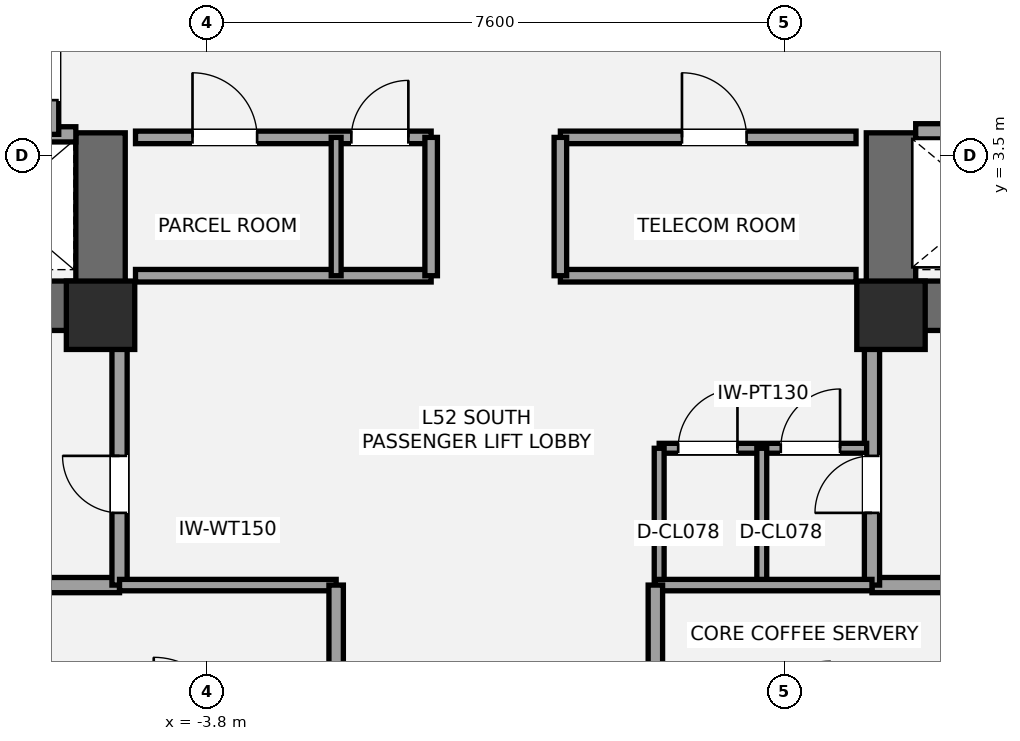
"""IFC4 building model, lengths in metres.
Left out: names, types, materials, properties, quantities, classifications, styles, units other than length and angle.
Written with IfcOpenShell. Run it as: python <this file> out.ifc"""

import sys

from ifc_helpers import new_model, si_unit, direction, frame, frame_2d, origin, origin_2d, place, context, subcontext, project, spatial, rectangle, extrude, element, fill, save


model = new_model("IFC4")
c1 = context("Model", 3, precision=1e-05, world=origin(), true_north=direction((0.0, 1.0)))
c2 = subcontext(c1, "Body", "Model", "MODEL_VIEW")
j1 = project(units=[si_unit("LENGTHUNIT", "METRE"), si_unit("PLANEANGLEUNIT", "RADIAN")], contexts=[c1])
p1 = place(None, origin())
s1 = spatial("IfcSite", under=j1, at=p1, CompositionType="ELEMENT")
p2 = place(p1, origin())
s2 = spatial("IfcBuilding", under=s1, at=p2, CompositionType="ELEMENT")
p3 = place(p2, frame((0.0, 0.0, 188.6)))
s3 = spatial("IfcBuildingStorey", under=s2, at=p3, CompositionType="ELEMENT", Elevation=188.6)
p4 = place(p3, frame((-4.875, 1.525, 0.0), z_axis=(0.0, 0.0, 1.0), x_axis=(-1.0, 0.0, 0.0)))
e1 = element("IfcWall", 1, at=p4, inside=s3, PredefinedType="SHEAR", context=c2, shape_type="SweptSolid", body=[
    extrude(rectangle(XDim=8.925, YDim=0.65, at=frame_2d((4.462, 0.0))), origin(), (0.0, 0.0, 1.0), 3.2),
])
p5 = place(p4, frame((5.425, 0.0, 0.0)))
e2 = element("IfcOpeningElement", 2, at=p5, cuts=e1, PredefinedType="OPENING", context=c2, shape_type="SweptSolid", body=[
    extrude(rectangle(XDim=1.05, YDim=2.15, at=frame_2d((0.525, 1.075))), frame((0.0, 0.335, 0.0), z_axis=(0.0, -1.0, 0.0), x_axis=(1.0, 0.0, 0.0)), (0.0, 0.0, 1.0), 0.67),
])
p6 = place(p4, frame((3.755, 0.0, 0.0)))
e3 = element("IfcOpeningElement", 3, at=p6, cuts=e1, PredefinedType="OPENING", context=c2, shape_type="SweptSolid", body=[
    extrude(rectangle(XDim=1.1, YDim=2.2, at=frame_2d((0.55, 1.1))), frame((0.0, 0.335, 0.0), z_axis=(0.0, -1.0, 0.0), x_axis=(1.0, 0.0, 0.0)), (0.0, 0.0, 1.0), 0.67),
])
p7 = place(p3, frame((-5.2, 1.2, 0.0), z_axis=(0.0, 0.0, 1.0), x_axis=(0.0, 1.0, 0.0)))
e4 = element("IfcWall", 4, at=p7, inside=s3, PredefinedType="SHEAR", context=c2, shape_type="SweptSolid", body=[
    extrude(rectangle(XDim=2.6, YDim=0.65, at=frame_2d((1.3, 0.0))), origin(), (0.0, 0.0, 1.0), 3.2),
])
p8 = place(p3, frame((13.8, 1.525, 0.0), z_axis=(0.0, 0.0, 1.0), x_axis=(-1.0, 0.0, 0.0)))
e5 = element("IfcWall", 5, at=p8, inside=s3, PredefinedType="SHEAR", context=c2, shape_type="SweptSolid", body=[
    extrude(rectangle(XDim=8.925, YDim=0.65, at=frame_2d((4.462, 0.0))), origin(), (0.0, 0.0, 1.0), 3.2),
])
p9 = place(p8, frame((2.45, 0.0, 0.0)))
e6 = element("IfcOpeningElement", 6, at=p9, cuts=e5, PredefinedType="OPENING", context=c2, shape_type="SweptSolid", body=[
    extrude(rectangle(XDim=1.05, YDim=2.15, at=frame_2d((0.525, 1.075))), frame((0.0, 0.335, 0.0), z_axis=(0.0, -1.0, 0.0), x_axis=(1.0, 0.0, 0.0)), (0.0, 0.0, 1.0), 0.67),
])
p10 = place(p8, frame((4.45, 0.0, 0.0)))
e7 = element("IfcOpeningElement", 7, at=p10, cuts=e5, PredefinedType="OPENING", context=c2, shape_type="SweptSolid", body=[
    extrude(rectangle(XDim=1.1, YDim=2.2, at=frame_2d((0.55, 1.1))), frame((0.0, 0.335, 0.0), z_axis=(0.0, -1.0, 0.0), x_axis=(1.0, 0.0, 0.0)), (0.0, 0.0, 1.0), 0.67),
])
p11 = place(p3, frame((5.2, 1.2, 0.0), z_axis=(0.0, 0.0, 1.0), x_axis=(0.0, 1.0, 0.0)))
e8 = element("IfcWall", 8, at=p11, inside=s3, PredefinedType="SHEAR", context=c2, shape_type="SweptSolid", body=[
    extrude(rectangle(XDim=2.6, YDim=0.65, at=frame_2d((1.3, 0.0))), origin(), (0.0, 0.0, 1.0), 3.2),
])
for number, where, z_axis, x_axis in (
    (9, (-5.2, 1.4, 0.0), (0.0, 0.0, 1.0), (1.0, 0.0, 0.0)),
    (10, (5.2, 1.4, 0.0), (0.0, 0.0, 1.0), (1.0, 0.0, 0.0)),
):
    element("IfcColumn", number, at=place(p3, frame(where, z_axis=z_axis, x_axis=x_axis)), inside=s3, PredefinedType="COLUMN", context=c2, shape_type="SweptSolid", body=[
        extrude(rectangle(XDim=0.9, YDim=0.9, at=origin_2d()), origin(), (0.0, 0.0, 1.0), 3.2),
    ])
p12 = place(p3, frame((-7.2, -2.15, 0.0), z_axis=(0.0, 0.0, 1.0), x_axis=(1.0, 0.0, 0.0)))
e11 = element("IfcWall", 11, at=p12, inside=s3, PredefinedType="SOLIDWALL", context=c2, shape_type="SweptSolid", body=[
    extrude(rectangle(XDim=2.25, YDim=0.2, at=frame_2d((1.125, 0.0))), origin(), (0.0, 0.0, 1.0), 3.02),
])
p13 = place(p3, frame((-4.95, -2.15, 0.0), z_axis=(0.0, 0.0, 1.0), x_axis=(0.0, 1.0, 0.0)))
e12 = element("IfcWall", 12, at=p13, inside=s3, PredefinedType="SOLIDWALL", context=c2, shape_type="SweptSolid", body=[
    extrude(rectangle(XDim=3.4, YDim=0.2, at=frame_2d((1.7, 0.0))), origin(), (0.0, 0.0, 1.0), 2.473),
])
p14 = place(p13, frame((0.95, 0.0, 0.0)))
e13 = element("IfcOpeningElement", 13, at=p14, cuts=e12, PredefinedType="OPENING", context=c2, shape_type="SweptSolid", body=[
    extrude(rectangle(XDim=0.75, YDim=2.1, at=frame_2d((0.375, 1.05))), frame((0.0, 0.11, 0.0), z_axis=(0.0, -1.0, 0.0), x_axis=(1.0, 0.0, 0.0)), (0.0, 0.0, 1.0), 0.22),
])
p15 = place(p3, frame((4.95, -2.15, 0.0), z_axis=(0.0, 0.0, 1.0), x_axis=(1.0, 0.0, 0.0)))
e14 = element("IfcWall", 14, at=p15, inside=s3, PredefinedType="SOLIDWALL", context=c2, shape_type="SweptSolid", body=[
    extrude(rectangle(XDim=2.25, YDim=0.2, at=frame_2d((1.125, 0.0))), origin(), (0.0, 0.0, 1.0), 3.02),
])
p16 = place(p3, frame((4.95, -2.15, 0.0), z_axis=(0.0, 0.0, 1.0), x_axis=(0.0, 1.0, 0.0)))
e15 = element("IfcWall", 15, at=p16, inside=s3, PredefinedType="SOLIDWALL", context=c2, shape_type="SweptSolid", body=[
    extrude(rectangle(XDim=3.4, YDim=0.2, at=frame_2d((1.7, 0.0))), origin(), (0.0, 0.0, 1.0), 2.473),
])
p17 = place(p16, frame((0.95, 0.0, 0.0)))
e16 = element("IfcOpeningElement", 16, at=p17, cuts=e15, PredefinedType="OPENING", context=c2, shape_type="SweptSolid", body=[
    extrude(rectangle(XDim=0.75, YDim=2.1, at=frame_2d((0.375, 1.05))), frame((0.0, 0.11, 0.0), z_axis=(0.0, -1.0, 0.0), x_axis=(1.0, 0.0, 0.0)), (0.0, 0.0, 1.0), 0.22),
])
p18 = place(p3, frame((2.15, -0.35, 0.0), z_axis=(0.0, 0.0, 1.0), x_axis=(1.0, 0.0, 0.0)))
e17 = element("IfcWall", 17, at=p18, inside=s3, PredefinedType="PARTITIONING", context=c2, shape_type="SweptSolid", body=[
    extrude(rectangle(XDim=2.73, YDim=0.13, at=frame_2d((1.365, 0.0))), origin(), (0.0, 0.0, 1.0), 3.02),
])
p19 = place(p18, frame((0.25, 0.0, 0.0)))
e18 = element("IfcOpeningElement", 18, at=p19, cuts=e17, PredefinedType="OPENING", context=c2, shape_type="SweptSolid", body=[
    extrude(rectangle(XDim=0.78, YDim=2.1, at=frame_2d((0.39, 1.05))), frame((0.0, 0.075, 0.0), z_axis=(0.0, -1.0, 0.0), x_axis=(1.0, 0.0, 0.0)), (0.0, 0.0, 1.0), 0.15),
])
p20 = place(p18, frame((1.6, 0.0, 0.0)))
e19 = element("IfcOpeningElement", 19, at=p20, cuts=e17, PredefinedType="OPENING", context=c2, shape_type="SweptSolid", body=[
    extrude(rectangle(XDim=0.78, YDim=2.1, at=frame_2d((0.39, 1.05))), frame((0.0, 0.075, 0.0), z_axis=(0.0, -1.0, 0.0), x_axis=(1.0, 0.0, 0.0)), (0.0, 0.0, 1.0), 0.15),
])
for number, where, z_axis, x_axis in (
    (20, (2.15, -2.15, 0.0), (0.0, 0.0, 1.0), (0.0, 1.0, 0.0)),
    (21, (3.5, -2.15, 0.0), (0.0, 0.0, 1.0), (0.0, 1.0, 0.0)),
):
    element("IfcWall", number, at=place(p3, frame(where, z_axis=z_axis, x_axis=x_axis)), inside=s3, PredefinedType="PARTITIONING", context=c2, shape_type="SweptSolid", body=[
        extrude(rectangle(XDim=1.8, YDim=0.13, at=frame_2d((0.9, 0.0))), origin(), (0.0, 0.0, 1.0), 3.02),
    ])
p21 = place(p3, frame((-9.78, 3.78, 0.0), z_axis=(0.0, 0.0, 1.0), x_axis=(1.0, 0.0, 0.0)))
e22 = element("IfcWall", 22, at=p21, inside=s3, PredefinedType="SOLIDWALL", context=c2, shape_type="SweptSolid", body=[
    extrude(rectangle(XDim=4.255, YDim=0.2, at=frame_2d((2.127, 0.0))), origin(), (0.0, 0.0, 1.0), 3.02),
])
p22 = place(p3, frame((-5.85, 3.78, 0.0), z_axis=(0.0, 0.0, 1.0), x_axis=(0.0, 1.0, 0.0)))
e23 = element("IfcWall", 23, at=p22, inside=s3, PredefinedType="SOLIDWALL", context=c2, shape_type="SweptSolid", body=[
    extrude(rectangle(XDim=1.69, YDim=0.2, at=frame_2d((0.845, 0.0))), origin(), (0.0, 0.0, 1.0), 3.02),
])
p23 = place(p22, frame((0.45, 0.0, 0.0)))
e24 = element("IfcOpeningElement", 24, at=p23, cuts=e23, PredefinedType="OPENING", context=c2, shape_type="SweptSolid", body=[
    extrude(rectangle(XDim=0.75, YDim=2.1, at=frame_2d((0.375, 1.05))), frame((0.0, 0.11, 0.0), z_axis=(0.0, -1.0, 0.0), x_axis=(1.0, 0.0, 0.0)), (0.0, 0.0, 1.0), 0.22),
])
p24 = place(p3, frame((5.525, 3.82, 0.0), z_axis=(0.0, 0.0, 1.0), x_axis=(1.0, 0.0, 0.0)))
e25 = element("IfcWall", 25, at=p24, inside=s3, PredefinedType="SOLIDWALL", context=c2, shape_type="SweptSolid", body=[
    extrude(rectangle(XDim=4.255, YDim=0.2, at=frame_2d((2.127, 0.0))), origin(), (0.0, 0.0, 1.0), 3.02),
])
p25 = place(p24, frame((0.65, 0.0, 0.0)))
e26 = element("IfcOpeningElement", 26, at=p25, cuts=e25, PredefinedType="OPENING", context=c2, shape_type="SweptSolid", body=[
    extrude(rectangle(XDim=1.2, YDim=2.2, at=frame_2d((0.6, 1.1))), frame((0.0, 0.11, 0.0), z_axis=(0.0, -1.0, 0.0), x_axis=(1.0, 0.0, 0.0)), (0.0, 0.0, 1.0), 0.22),
])
p26 = place(p3, frame((-4.74, 1.92, 0.0), z_axis=(0.0, 0.0, 1.0), x_axis=(1.0, 0.0, 0.0)))
e27 = element("IfcWall", 27, at=p26, inside=s3, PredefinedType="PARTITIONING", context=c2, shape_type="SweptSolid", body=[
    extrude(rectangle(XDim=3.89, YDim=0.165, at=frame_2d((1.945, 0.0))), origin(), (0.0, 0.0, 1.0), 2.16),
])
p27 = place(p3, frame((-4.74, 3.74, 0.0), z_axis=(0.0, 0.0, 1.0), x_axis=(1.0, 0.0, 0.0)))
e28 = element("IfcWall", 28, at=p27, inside=s3, PredefinedType="PARTITIONING", context=c2, shape_type="SweptSolid", body=[
    extrude(rectangle(XDim=3.89, YDim=0.165, at=frame_2d((1.945, 0.0))), origin(), (0.0, 0.0, 1.0), 3.02),
])
p28 = place(p27, frame((0.75, 0.0, 0.0)))
e29 = element("IfcOpeningElement", 29, at=p28, cuts=e28, PredefinedType="OPENING", context=c2, shape_type="SweptSolid", body=[
    extrude(rectangle(XDim=0.85, YDim=2.1, at=frame_2d((0.425, 1.05))), frame((0.0, 0.093, 0.0), z_axis=(0.0, -1.0, 0.0), x_axis=(1.0, 0.0, 0.0)), (0.0, 0.0, 1.0), 0.185),
])
p29 = place(p27, frame((2.84, 0.0, 0.0)))
e30 = element("IfcOpeningElement", 30, at=p29, cuts=e28, PredefinedType="OPENING", context=c2, shape_type="SweptSolid", body=[
    extrude(rectangle(XDim=0.75, YDim=2.1, at=frame_2d((0.375, 1.05))), frame((0.0, 0.093, 0.0), z_axis=(0.0, -1.0, 0.0), x_axis=(1.0, 0.0, 0.0)), (0.0, 0.0, 1.0), 0.185),
])
p30 = place(p3, frame((-0.85, 1.92, 0.0), z_axis=(0.0, 0.0, 1.0), x_axis=(0.0, 1.0, 0.0)))
e31 = element("IfcWall", 31, at=p30, inside=s3, PredefinedType="PARTITIONING", context=c2, shape_type="SweptSolid", body=[
    extrude(rectangle(XDim=1.82, YDim=0.165, at=frame_2d((0.91, 0.0))), origin(), (0.0, 0.0, 1.0), 3.02),
])
p31 = place(p3, frame((0.85, 1.92, 0.0), z_axis=(0.0, 0.0, 1.0), x_axis=(1.0, 0.0, 0.0)))
e32 = element("IfcWall", 32, at=p31, inside=s3, PredefinedType="PARTITIONING", context=c2, shape_type="SweptSolid", body=[
    extrude(rectangle(XDim=3.89, YDim=0.165, at=frame_2d((1.945, 0.0))), origin(), (0.0, 0.0, 1.0), 2.16),
])
p32 = place(p3, frame((0.85, 3.74, 0.0), z_axis=(0.0, 0.0, 1.0), x_axis=(1.0, 0.0, 0.0)))
e33 = element("IfcWall", 33, at=p32, inside=s3, PredefinedType="PARTITIONING", context=c2, shape_type="SweptSolid", body=[
    extrude(rectangle(XDim=3.89, YDim=0.165, at=frame_2d((1.945, 0.0))), origin(), (0.0, 0.0, 1.0), 3.02),
])
p33 = place(p32, frame((1.6, 0.0, 0.0)))
e34 = element("IfcOpeningElement", 34, at=p33, cuts=e33, PredefinedType="OPENING", context=c2, shape_type="SweptSolid", body=[
    extrude(rectangle(XDim=0.85, YDim=2.1, at=frame_2d((0.425, 1.05))), frame((0.0, 0.093, 0.0), z_axis=(0.0, -1.0, 0.0), x_axis=(1.0, 0.0, 0.0)), (0.0, 0.0, 1.0), 0.185),
])
p34 = place(p3, frame((0.85, 1.92, 0.0), z_axis=(0.0, 0.0, 1.0), x_axis=(0.0, 1.0, 0.0)))
e35 = element("IfcWall", 35, at=p34, inside=s3, PredefinedType="PARTITIONING", context=c2, shape_type="SweptSolid", body=[
    extrude(rectangle(XDim=1.82, YDim=0.165, at=frame_2d((0.91, 0.0))), origin(), (0.0, 0.0, 1.0), 3.02),
])
p35 = place(p3, frame((-2.1, 1.92, 0.0), z_axis=(0.0, 0.0, 1.0), x_axis=(0.0, 1.0, 0.0)))
e36 = element("IfcWall", 36, at=p35, inside=s3, PredefinedType="PARTITIONING", context=c2, shape_type="SweptSolid", body=[
    extrude(rectangle(XDim=1.82, YDim=0.13, at=frame_2d((0.91, 0.0))), origin(), (0.0, 0.0, 1.0), 3.02),
])
p36 = place(p3, frame((-4.95, -2.15, 0.0), z_axis=(0.0, 0.0, 1.0), x_axis=(1.0, 0.0, 0.0)))
e37 = element("IfcWall", 37, at=p36, inside=s3, PredefinedType="PLUMBINGWALL", context=c2, shape_type="SweptSolid", body=[
    extrude(rectangle(XDim=2.85, YDim=0.15, at=frame_2d((1.425, 0.0))), origin(), (0.0, 0.0, 1.0), 2.473),
])
p37 = place(p3, frame((-2.1, -4.05, 0.0), z_axis=(0.0, 0.0, 1.0), x_axis=(0.0, 1.0, 0.0)))
e38 = element("IfcWall", 38, at=p37, inside=s3, PredefinedType="PLUMBINGWALL", context=c2, shape_type="SweptSolid", body=[
    extrude(rectangle(XDim=1.9, YDim=0.19, at=frame_2d((0.95, 0.0))), origin(), (0.0, 0.0, 1.0), 3.02),
])
p38 = place(p3, frame((2.1, -2.15, 0.0), z_axis=(0.0, 0.0, 1.0), x_axis=(1.0, 0.0, 0.0)))
e39 = element("IfcWall", 39, at=p38, inside=s3, PredefinedType="PLUMBINGWALL", context=c2, shape_type="SweptSolid", body=[
    extrude(rectangle(XDim=2.85, YDim=0.15, at=frame_2d((1.425, 0.0))), origin(), (0.0, 0.0, 1.0), 3.02),
])
p39 = place(p3, frame((2.1, -4.05, 0.0), z_axis=(0.0, 0.0, 1.0), x_axis=(0.0, 1.0, 0.0)))
e40 = element("IfcWall", 40, at=p39, inside=s3, PredefinedType="PLUMBINGWALL", context=c2, shape_type="SweptSolid", body=[
    extrude(rectangle(XDim=1.9, YDim=0.19, at=frame_2d((0.95, 0.0))), origin(), (0.0, 0.0, 1.0), 3.02),
])
p40 = place(p14, origin())
e41 = element("IfcDoor", 41, at=p40, inside=s3, OperationType="SINGLE_SWING_RIGHT", PredefinedType="DOOR", context=c2, shape_type="SweptSolid", body=[
    extrude(rectangle(XDim=0.75, YDim=2.1, at=frame_2d((0.375, 1.05))), frame((0.0, 0.025, 0.0), z_axis=(0.0, -1.0, 0.0), x_axis=(1.0, 0.0, 0.0)), (0.0, 0.0, 1.0), 0.05),
])
fill(e13, e41)
p41 = place(p17, origin())
e42 = element("IfcDoor", 42, at=p41, inside=s3, OperationType="SINGLE_SWING_LEFT", PredefinedType="DOOR", context=c2, shape_type="SweptSolid", body=[
    extrude(rectangle(XDim=0.75, YDim=2.1, at=frame_2d((0.375, 1.05))), frame((0.0, 0.025, 0.0), z_axis=(0.0, -1.0, 0.0), x_axis=(1.0, 0.0, 0.0)), (0.0, 0.0, 1.0), 0.05),
])
fill(e16, e42)
p42 = place(p19, origin())
e43 = element("IfcDoor", 43, at=p42, inside=s3, OperationType="SINGLE_SWING_RIGHT", PredefinedType="DOOR", context=c2, shape_type="SweptSolid", body=[
    extrude(rectangle(XDim=0.78, YDim=2.1, at=frame_2d((0.39, 1.05))), frame((0.0, 0.025, 0.0), z_axis=(0.0, -1.0, 0.0), x_axis=(1.0, 0.0, 0.0)), (0.0, 0.0, 1.0), 0.05),
])
fill(e18, e43)
p43 = place(p20, origin())
e44 = element("IfcDoor", 44, at=p43, inside=s3, OperationType="SINGLE_SWING_RIGHT", PredefinedType="DOOR", context=c2, shape_type="SweptSolid", body=[
    extrude(rectangle(XDim=0.78, YDim=2.1, at=frame_2d((0.39, 1.05))), frame((0.0, 0.025, 0.0), z_axis=(0.0, -1.0, 0.0), x_axis=(1.0, 0.0, 0.0)), (0.0, 0.0, 1.0), 0.05),
])
fill(e19, e44)
p44 = place(p23, origin())
e45 = element("IfcDoor", 45, at=p44, inside=s3, OperationType="SINGLE_SWING_RIGHT", PredefinedType="DOOR", context=c2, shape_type="SweptSolid", body=[
    extrude(rectangle(XDim=0.75, YDim=2.1, at=frame_2d((0.375, 1.05))), frame((0.0, 0.025, 0.0), z_axis=(0.0, -1.0, 0.0), x_axis=(1.0, 0.0, 0.0)), (0.0, 0.0, 1.0), 0.05),
])
fill(e24, e45)
p45 = place(p28, origin())
e46 = element("IfcDoor", 46, at=p45, inside=s3, OperationType="SINGLE_SWING_LEFT", PredefinedType="DOOR", context=c2, shape_type="SweptSolid", body=[
    extrude(rectangle(XDim=0.85, YDim=2.1, at=frame_2d((0.425, 1.05))), frame((0.0, 0.025, 0.0), z_axis=(0.0, -1.0, 0.0), x_axis=(1.0, 0.0, 0.0)), (0.0, 0.0, 1.0), 0.05),
])
fill(e29, e46)
p46 = place(p29, origin())
e47 = element("IfcDoor", 47, at=p46, inside=s3, OperationType="SINGLE_SWING_RIGHT", PredefinedType="DOOR", context=c2, shape_type="SweptSolid", body=[
    extrude(rectangle(XDim=0.75, YDim=2.1, at=frame_2d((0.375, 1.05))), frame((0.0, 0.025, 0.0), z_axis=(0.0, -1.0, 0.0), x_axis=(1.0, 0.0, 0.0)), (0.0, 0.0, 1.0), 0.05),
])
fill(e30, e47)
p47 = place(p33, origin())
e48 = element("IfcDoor", 48, at=p47, inside=s3, OperationType="SINGLE_SWING_LEFT", PredefinedType="DOOR", context=c2, shape_type="SweptSolid", body=[
    extrude(rectangle(XDim=0.85, YDim=2.1, at=frame_2d((0.425, 1.05))), frame((0.0, 0.025, 0.0), z_axis=(0.0, -1.0, 0.0), x_axis=(1.0, 0.0, 0.0)), (0.0, 0.0, 1.0), 0.05),
])
fill(e34, e48)
save(model, sys.argv[1])
